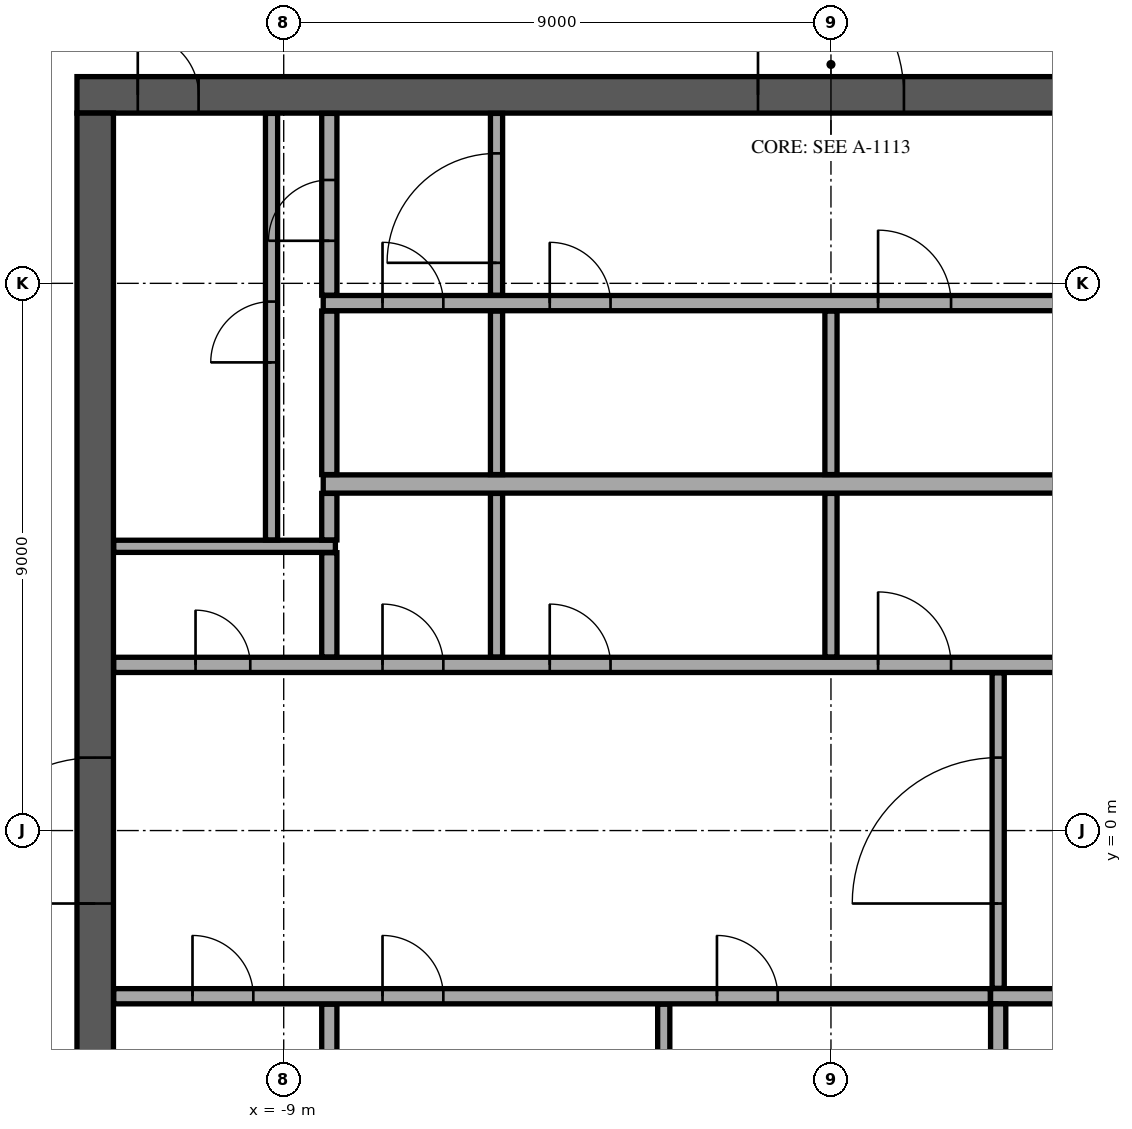
"""IFC4 building model, lengths in metres.
Left out: names, types, materials, properties, quantities, classifications, styles, units other than length and angle.
Written with IfcOpenShell. Run it as: python <this file> out.ifc"""

import sys

from ifc_helpers import new_model, si_unit, direction, frame, frame_2d, origin, place, context, subcontext, project, spatial, rectangle, extrude, element, fill, save


model = new_model("IFC4")
c1 = context("Model", 3, precision=1e-05, world=origin(), true_north=direction((0.0, 1.0)))
c2 = subcontext(c1, "Body", "Model", "MODEL_VIEW")
j1 = project(units=[si_unit("LENGTHUNIT", "METRE"), si_unit("PLANEANGLEUNIT", "RADIAN")], contexts=[c1])
p1 = place(None, origin())
s1 = spatial("IfcSite", under=j1, at=p1, CompositionType="ELEMENT")
p2 = place(p1, origin())
s2 = spatial("IfcBuilding", under=s1, at=p2, CompositionType="ELEMENT")
p3 = place(p2, frame((0.0, 0.0, 373.1)))
s3 = spatial("IfcBuildingStorey", under=s2, at=p3, CompositionType="ELEMENT", Elevation=373.1)
p4 = place(p3, frame((-12.4, 12.1, 0.0), z_axis=(0.0, 0.0, 1.0), x_axis=(1.0, 0.0, 0.0)))
e1 = element("IfcWall", 1, at=p4, inside=s3, PredefinedType="SHEAR", context=c2, shape_type="SweptSolid", body=[
    extrude(rectangle(XDim=24.8, YDim=0.6, at=frame_2d((12.4, 0.0))), origin(), (0.0, 0.0, 1.0), 3.2),
])
p5 = place(p4, frame((11.2, 0.0, 0.0)))
e2 = element("IfcOpeningElement", 2, at=p5, cuts=e1, PredefinedType="OPENING", context=c2, shape_type="SweptSolid", body=[
    extrude(rectangle(XDim=2.4, YDim=2.4, at=frame_2d((1.2, 1.2))), frame((0.0, 0.31, 0.0), z_axis=(0.0, -1.0, 0.0), x_axis=(1.0, 0.0, 0.0)), (0.0, 0.0, 1.0), 0.62),
])
p6 = place(p4, frame((22.025, 0.0, 0.0)))
e3 = element("IfcOpeningElement", 3, at=p6, cuts=e1, PredefinedType="OPENING", context=c2, shape_type="SweptSolid", body=[
    extrude(rectangle(XDim=1.2, YDim=2.1, at=frame_2d((0.6, 1.05))), frame((0.0, 0.31, 0.0), z_axis=(0.0, -1.0, 0.0), x_axis=(1.0, 0.0, 0.0)), (0.0, 0.0, 1.0), 0.62),
])
p7 = place(p4, frame((1.0, 0.0, 0.0)))
e4 = element("IfcOpeningElement", 4, at=p7, cuts=e1, PredefinedType="OPENING", context=c2, shape_type="SweptSolid", body=[
    extrude(rectangle(XDim=1.0, YDim=2.1, at=frame_2d((0.5, 1.05))), frame((0.0, 0.31, 0.0), z_axis=(0.0, -1.0, 0.0), x_axis=(1.0, 0.0, 0.0)), (0.0, 0.0, 1.0), 0.62),
])
p8 = place(p3, frame((-12.1, -11.8, 0.0), z_axis=(0.0, 0.0, 1.0), x_axis=(0.0, 1.0, 0.0)))
e5 = element("IfcWall", 5, at=p8, inside=s3, PredefinedType="SHEAR", context=c2, shape_type="SweptSolid", body=[
    extrude(rectangle(XDim=23.6, YDim=0.6, at=frame_2d((11.8, 0.0))), origin(), (0.0, 0.0, 1.0), 3.2),
])
p9 = place(p8, frame((10.6, 0.0, 0.0)))
e6 = element("IfcOpeningElement", 6, at=p9, cuts=e5, PredefinedType="OPENING", context=c2, shape_type="SweptSolid", body=[
    extrude(rectangle(XDim=2.4, YDim=2.4, at=frame_2d((1.2, 1.2))), frame((0.0, 0.31, 0.0), z_axis=(0.0, -1.0, 0.0), x_axis=(1.0, 0.0, 0.0)), (0.0, 0.0, 1.0), 0.62),
])
p10 = place(p3, frame((2.625, -2.725, 0.0), z_axis=(0.0, 0.0, 1.0), x_axis=(1.0, 0.0, 0.0)))
e7 = element("IfcWall", 7, at=p10, inside=s3, PredefinedType="SOLIDWALL", context=c2, shape_type="SweptSolid", body=[
    extrude(rectangle(XDim=3.0, YDim=0.25, at=frame_2d((1.5, 0.0))), origin(), (0.0, 0.0, 1.0), 3.2),
])
p11 = place(p3, frame((2.75, -5.55, 0.0), z_axis=(0.0, 0.0, 1.0), x_axis=(0.0, 1.0, 0.0)))
e8 = element("IfcWall", 8, at=p11, inside=s3, PredefinedType="SOLIDWALL", context=c2, shape_type="SweptSolid", body=[
    extrude(rectangle(XDim=2.7, YDim=0.25, at=frame_2d((1.35, 0.0))), origin(), (0.0, 0.0, 1.0), 3.2),
])
p12 = place(p3, frame((-8.25, -5.545, 0.0), z_axis=(0.0, 0.0, 1.0), x_axis=(0.0, 1.0, 0.0)))
e9 = element("IfcWall", 9, at=p12, inside=s3, PredefinedType="PARTITIONING", context=c2, shape_type="SweptSolid", body=[
    extrude(rectangle(XDim=2.69, YDim=0.25, at=frame_2d((1.345, 0.0))), origin(), (0.0, 0.0, 1.0), 3.2),
])
p13 = place(p3, frame((-2.75, -5.545, 0.0), z_axis=(0.0, 0.0, 1.0), x_axis=(0.0, 1.0, 0.0)))
e10 = element("IfcWall", 10, at=p13, inside=s3, PredefinedType="PARTITIONING", context=c2, shape_type="SweptSolid", body=[
    extrude(rectangle(XDim=2.69, YDim=0.2, at=frame_2d((1.345, 0.0))), origin(), (0.0, 0.0, 1.0), 3.2),
])
p14 = place(p3, frame((-11.795, -2.725, 0.0), z_axis=(0.0, 0.0, 1.0), x_axis=(1.0, 0.0, 0.0)))
e11 = element("IfcWall", 11, at=p14, inside=s3, PredefinedType="PARTITIONING", context=c2, shape_type="SweptSolid", body=[
    extrude(rectangle(XDim=14.415, YDim=0.25, at=frame_2d((7.208, 0.0))), origin(), (0.0, 0.0, 1.0), 3.2),
])
p15 = place(p14, frame((1.295, 0.0, 0.0)))
e12 = element("IfcOpeningElement", 12, at=p15, cuts=e11, PredefinedType="OPENING", context=c2, shape_type="SweptSolid", body=[
    extrude(rectangle(XDim=1.0, YDim=2.1, at=frame_2d((0.5, 1.05))), frame((0.0, 0.135, 0.0), z_axis=(0.0, -1.0, 0.0), x_axis=(1.0, 0.0, 0.0)), (0.0, 0.0, 1.0), 0.27),
])
p16 = place(p14, frame((4.42, 0.0, 0.0)))
e13 = element("IfcOpeningElement", 13, at=p16, cuts=e11, PredefinedType="OPENING", context=c2, shape_type="SweptSolid", body=[
    extrude(rectangle(XDim=1.0, YDim=2.1, at=frame_2d((0.5, 1.05))), frame((0.0, 0.135, 0.0), z_axis=(0.0, -1.0, 0.0), x_axis=(1.0, 0.0, 0.0)), (0.0, 0.0, 1.0), 0.27),
])
p17 = place(p14, frame((9.92, 0.0, 0.0)))
e14 = element("IfcOpeningElement", 14, at=p17, cuts=e11, PredefinedType="OPENING", context=c2, shape_type="SweptSolid", body=[
    extrude(rectangle(XDim=1.0, YDim=2.1, at=frame_2d((0.5, 1.05))), frame((0.0, 0.135, 0.0), z_axis=(0.0, -1.0, 0.0), x_axis=(1.0, 0.0, 0.0)), (0.0, 0.0, 1.0), 0.27),
])
p18 = place(p3, frame((2.75, -2.595, 0.0), z_axis=(0.0, 0.0, 1.0), x_axis=(0.0, 1.0, 0.0)))
e15 = element("IfcWall", 15, at=p18, inside=s3, PredefinedType="PARTITIONING", context=c2, shape_type="SweptSolid", body=[
    extrude(rectangle(XDim=5.19, YDim=0.2, at=frame_2d((2.595, 0.0))), origin(), (0.0, 0.0, 1.0), 3.2),
])
p19 = place(p18, frame((1.395, 0.0, 0.0)))
e16 = element("IfcOpeningElement", 16, at=p19, cuts=e15, PredefinedType="OPENING", context=c2, shape_type="SweptSolid", body=[
    extrude(rectangle(XDim=2.4, YDim=2.4, at=frame_2d((1.2, 1.2))), frame((0.0, 0.11, 0.0), z_axis=(0.0, -1.0, 0.0), x_axis=(1.0, 0.0, 0.0)), (0.0, 0.0, 1.0), 0.22),
])
p20 = place(p3, frame((-11.795, 2.725, 0.0), z_axis=(0.0, 0.0, 1.0), x_axis=(1.0, 0.0, 0.0)))
e17 = element("IfcWall", 17, at=p20, inside=s3, PredefinedType="PARTITIONING", context=c2, shape_type="SweptSolid", body=[
    extrude(rectangle(XDim=23.59, YDim=0.25, at=frame_2d((11.795, 0.0))), origin(), (0.0, 0.0, 1.0), 3.2),
])
p21 = place(p20, frame((21.345, 0.0, 0.0)))
e18 = element("IfcOpeningElement", 18, at=p21, cuts=e17, PredefinedType="OPENING", context=c2, shape_type="SweptSolid", body=[
    extrude(rectangle(XDim=0.9, YDim=2.1, at=frame_2d((0.45, 1.05))), frame((0.0, 0.135, 0.0), z_axis=(0.0, -1.0, 0.0), x_axis=(1.0, 0.0, 0.0)), (0.0, 0.0, 1.0), 0.27),
])
p22 = place(p20, frame((1.345, 0.0, 0.0)))
e19 = element("IfcOpeningElement", 19, at=p22, cuts=e17, PredefinedType="OPENING", context=c2, shape_type="SweptSolid", body=[
    extrude(rectangle(XDim=0.9, YDim=2.1, at=frame_2d((0.45, 1.05))), frame((0.0, 0.135, 0.0), z_axis=(0.0, -1.0, 0.0), x_axis=(1.0, 0.0, 0.0)), (0.0, 0.0, 1.0), 0.27),
])
p23 = place(p20, frame((4.42, 0.0, 0.0)))
e20 = element("IfcOpeningElement", 20, at=p23, cuts=e17, PredefinedType="OPENING", context=c2, shape_type="SweptSolid", body=[
    extrude(rectangle(XDim=1.0, YDim=2.1, at=frame_2d((0.5, 1.05))), frame((0.0, 0.135, 0.0), z_axis=(0.0, -1.0, 0.0), x_axis=(1.0, 0.0, 0.0)), (0.0, 0.0, 1.0), 0.27),
])
p24 = place(p20, frame((7.17, 0.0, 0.0)))
e21 = element("IfcOpeningElement", 21, at=p24, cuts=e17, PredefinedType="OPENING", context=c2, shape_type="SweptSolid", body=[
    extrude(rectangle(XDim=1.0, YDim=2.1, at=frame_2d((0.5, 1.05))), frame((0.0, 0.135, 0.0), z_axis=(0.0, -1.0, 0.0), x_axis=(1.0, 0.0, 0.0)), (0.0, 0.0, 1.0), 0.27),
])
p25 = place(p20, frame((12.57, 0.0, 0.0)))
e22 = element("IfcOpeningElement", 22, at=p25, cuts=e17, PredefinedType="OPENING", context=c2, shape_type="SweptSolid", body=[
    extrude(rectangle(XDim=1.2, YDim=2.1, at=frame_2d((0.6, 1.05))), frame((0.0, 0.135, 0.0), z_axis=(0.0, -1.0, 0.0), x_axis=(1.0, 0.0, 0.0)), (0.0, 0.0, 1.0), 0.27),
])
p26 = place(p3, frame((-8.25, 2.855, 0.0), z_axis=(0.0, 0.0, 1.0), x_axis=(0.0, 1.0, 0.0)))
e23 = element("IfcWall", 23, at=p26, inside=s3, PredefinedType="PARTITIONING", context=c2, shape_type="SweptSolid", body=[
    extrude(rectangle(XDim=1.715, YDim=0.25, at=frame_2d((0.857, 0.0))), origin(), (0.0, 0.0, 1.0), 3.2),
])
for number, where, z_axis, x_axis in (
    (24, (-5.5, 2.855, 0.0), (0.0, 0.0, 1.0), (0.0, 1.0, 0.0)),
    (25, (0.0, 2.855, 0.0), (0.0, 0.0, 1.0), (0.0, 1.0, 0.0)),
):
    element("IfcWall", number, at=place(p3, frame(where, z_axis=z_axis, x_axis=x_axis)), inside=s3, PredefinedType="PARTITIONING", context=c2, shape_type="SweptSolid", body=[
        extrude(rectangle(XDim=2.69, YDim=0.2, at=frame_2d((1.345, 0.0))), origin(), (0.0, 0.0, 1.0), 3.2),
    ])
p27 = place(p3, frame((-11.795, 4.675, 0.0), z_axis=(0.0, 0.0, 1.0), x_axis=(1.0, 0.0, 0.0)))
e26 = element("IfcWall", 26, at=p27, inside=s3, PredefinedType="PARTITIONING", context=c2, shape_type="SweptSolid", body=[
    extrude(rectangle(XDim=3.645, YDim=0.2, at=frame_2d((1.823, 0.0))), origin(), (0.0, 0.0, 1.0), 3.2),
])
p28 = place(p3, frame((-9.2, 4.78, 0.0), z_axis=(0.0, 0.0, 1.0), x_axis=(0.0, 1.0, 0.0)))
e27 = element("IfcWall", 27, at=p28, inside=s3, PredefinedType="PARTITIONING", context=c2, shape_type="SweptSolid", body=[
    extrude(rectangle(XDim=7.015, YDim=0.2, at=frame_2d((3.507, 0.0))), origin(), (0.0, 0.0, 1.0), 3.2),
])
p29 = place(p28, frame((2.92, 0.0, 0.0)))
e28 = element("IfcOpeningElement", 28, at=p29, cuts=e27, PredefinedType="OPENING", context=c2, shape_type="SweptSolid", body=[
    extrude(rectangle(XDim=1.0, YDim=2.1, at=frame_2d((0.5, 1.05))), frame((0.0, 0.11, 0.0), z_axis=(0.0, -1.0, 0.0), x_axis=(1.0, 0.0, 0.0)), (0.0, 0.0, 1.0), 0.22),
])
p30 = place(p3, frame((-8.25, 4.78, 0.0), z_axis=(0.0, 0.0, 1.0), x_axis=(0.0, 1.0, 0.0)))
e29 = element("IfcWall", 29, at=p30, inside=s3, PredefinedType="PARTITIONING", context=c2, shape_type="SweptSolid", body=[
    extrude(rectangle(XDim=0.765, YDim=0.25, at=frame_2d((0.382, 0.0))), origin(), (0.0, 0.0, 1.0), 3.2),
])
p31 = place(p3, frame((-8.35, 5.7, 0.0), z_axis=(0.0, 0.0, 1.0), x_axis=(1.0, 0.0, 0.0)))
e30 = element("IfcWall", 30, at=p31, inside=s3, PredefinedType="PARTITIONING", context=c2, shape_type="SweptSolid", body=[
    extrude(rectangle(XDim=16.7, YDim=0.3, at=frame_2d((8.35, 0.0))), origin(), (0.0, 0.0, 1.0), 3.2),
])
p32 = place(p3, frame((-8.25, 5.855, 0.0), z_axis=(0.0, 0.0, 1.0), x_axis=(0.0, 1.0, 0.0)))
e31 = element("IfcWall", 31, at=p32, inside=s3, PredefinedType="PARTITIONING", context=c2, shape_type="SweptSolid", body=[
    extrude(rectangle(XDim=2.69, YDim=0.25, at=frame_2d((1.345, 0.0))), origin(), (0.0, 0.0, 1.0), 3.2),
])
for number, where, z_axis, x_axis in (
    (32, (-5.5, 5.855, 0.0), (0.0, 0.0, 1.0), (0.0, 1.0, 0.0)),
    (33, (0.0, 5.855, 0.0), (0.0, 0.0, 1.0), (0.0, 1.0, 0.0)),
):
    element("IfcWall", number, at=place(p3, frame(where, z_axis=z_axis, x_axis=x_axis)), inside=s3, PredefinedType="PARTITIONING", context=c2, shape_type="SweptSolid", body=[
        extrude(rectangle(XDim=2.69, YDim=0.2, at=frame_2d((1.345, 0.0))), origin(), (0.0, 0.0, 1.0), 3.2),
    ])
p33 = place(p3, frame((-8.35, 8.675, 0.0), z_axis=(0.0, 0.0, 1.0), x_axis=(1.0, 0.0, 0.0)))
e34 = element("IfcWall", 34, at=p33, inside=s3, PredefinedType="PARTITIONING", context=c2, shape_type="SweptSolid", body=[
    extrude(rectangle(XDim=16.72, YDim=0.25, at=frame_2d((8.36, 0.0))), origin(), (0.0, 0.0, 1.0), 3.2),
])
p34 = place(p33, frame((0.975, 0.0, 0.0)))
e35 = element("IfcOpeningElement", 35, at=p34, cuts=e34, PredefinedType="OPENING", context=c2, shape_type="SweptSolid", body=[
    extrude(rectangle(XDim=1.0, YDim=2.1, at=frame_2d((0.5, 1.05))), frame((0.0, 0.135, 0.0), z_axis=(0.0, -1.0, 0.0), x_axis=(1.0, 0.0, 0.0)), (0.0, 0.0, 1.0), 0.27),
])
p35 = place(p33, frame((3.725, 0.0, 0.0)))
e36 = element("IfcOpeningElement", 36, at=p35, cuts=e34, PredefinedType="OPENING", context=c2, shape_type="SweptSolid", body=[
    extrude(rectangle(XDim=1.0, YDim=2.1, at=frame_2d((0.5, 1.05))), frame((0.0, 0.135, 0.0), z_axis=(0.0, -1.0, 0.0), x_axis=(1.0, 0.0, 0.0)), (0.0, 0.0, 1.0), 0.27),
])
p36 = place(p33, frame((9.125, 0.0, 0.0)))
e37 = element("IfcOpeningElement", 37, at=p36, cuts=e34, PredefinedType="OPENING", context=c2, shape_type="SweptSolid", body=[
    extrude(rectangle(XDim=1.2, YDim=2.1, at=frame_2d((0.6, 1.05))), frame((0.0, 0.135, 0.0), z_axis=(0.0, -1.0, 0.0), x_axis=(1.0, 0.0, 0.0)), (0.0, 0.0, 1.0), 0.27),
])
p37 = place(p3, frame((-8.25, 8.805, 0.0), z_axis=(0.0, 0.0, 1.0), x_axis=(0.0, 1.0, 0.0)))
e38 = element("IfcWall", 38, at=p37, inside=s3, PredefinedType="PARTITIONING", context=c2, shape_type="SweptSolid", body=[
    extrude(rectangle(XDim=2.99, YDim=0.25, at=frame_2d((1.495, 0.0))), origin(), (0.0, 0.0, 1.0), 3.2),
])
p38 = place(p37, frame((0.895, 0.0, 0.0)))
e39 = element("IfcOpeningElement", 39, at=p38, cuts=e38, PredefinedType="OPENING", context=c2, shape_type="SweptSolid", body=[
    extrude(rectangle(XDim=1.0, YDim=2.1, at=frame_2d((0.5, 1.05))), frame((0.0, 0.135, 0.0), z_axis=(0.0, -1.0, 0.0), x_axis=(1.0, 0.0, 0.0)), (0.0, 0.0, 1.0), 0.27),
])
p39 = place(p3, frame((-5.5, 8.805, 0.0), z_axis=(0.0, 0.0, 1.0), x_axis=(0.0, 1.0, 0.0)))
e40 = element("IfcWall", 40, at=p39, inside=s3, PredefinedType="PARTITIONING", context=c2, shape_type="SweptSolid", body=[
    extrude(rectangle(XDim=2.99, YDim=0.2, at=frame_2d((1.495, 0.0))), origin(), (0.0, 0.0, 1.0), 3.2),
])
p40 = place(p39, frame((0.532, 0.0, 0.0)))
e41 = element("IfcOpeningElement", 41, at=p40, cuts=e40, PredefinedType="OPENING", context=c2, shape_type="SweptSolid", body=[
    extrude(rectangle(XDim=1.8, YDim=2.1, at=frame_2d((0.9, 1.05))), frame((0.0, 0.11, 0.0), z_axis=(0.0, -1.0, 0.0), x_axis=(1.0, 0.0, 0.0)), (0.0, 0.0, 1.0), 0.22),
])
p41 = place(p5, origin())
e42 = element("IfcDoor", 42, at=p41, inside=s3, OperationType="SINGLE_SWING_LEFT", PredefinedType="DOOR", context=c2, shape_type="SweptSolid", body=[
    extrude(rectangle(XDim=2.4, YDim=2.4, at=frame_2d((1.2, 1.2))), frame((0.0, 0.025, 0.0), z_axis=(0.0, -1.0, 0.0), x_axis=(1.0, 0.0, 0.0)), (0.0, 0.0, 1.0), 0.05),
])
fill(e2, e42)
p42 = place(p7, origin())
e43 = element("IfcDoor", 43, at=p42, inside=s3, OperationType="SINGLE_SWING_LEFT", PredefinedType="DOOR", context=c2, shape_type="SweptSolid", body=[
    extrude(rectangle(XDim=1.0, YDim=2.1, at=frame_2d((0.5, 1.05))), frame((0.0, 0.025, 0.0), z_axis=(0.0, -1.0, 0.0), x_axis=(1.0, 0.0, 0.0)), (0.0, 0.0, 1.0), 0.05),
])
fill(e4, e43)
p43 = place(p9, origin())
e44 = element("IfcDoor", 44, at=p43, inside=s3, OperationType="SINGLE_SWING_LEFT", PredefinedType="DOOR", context=c2, shape_type="SweptSolid", body=[
    extrude(rectangle(XDim=2.4, YDim=2.4, at=frame_2d((1.2, 1.2))), frame((0.0, 0.025, 0.0), z_axis=(0.0, -1.0, 0.0), x_axis=(1.0, 0.0, 0.0)), (0.0, 0.0, 1.0), 0.05),
])
fill(e6, e44)
p44 = place(p15, origin())
e45 = element("IfcDoor", 45, at=p44, inside=s3, OperationType="SINGLE_SWING_RIGHT", PredefinedType="DOOR", context=c2, shape_type="SweptSolid", body=[
    extrude(rectangle(XDim=1.0, YDim=2.1, at=frame_2d((0.5, 1.05))), frame((0.0, 0.025, 0.0), z_axis=(0.0, -1.0, 0.0), x_axis=(1.0, 0.0, 0.0)), (0.0, 0.0, 1.0), 0.05),
])
fill(e12, e45)
p45 = place(p22, origin())
e46 = element("IfcDoor", 46, at=p45, inside=s3, OperationType="SINGLE_SWING_RIGHT", PredefinedType="DOOR", context=c2, shape_type="SweptSolid", body=[
    extrude(rectangle(XDim=0.9, YDim=2.1, at=frame_2d((0.45, 1.05))), frame((0.0, 0.025, 0.0), z_axis=(0.0, -1.0, 0.0), x_axis=(1.0, 0.0, 0.0)), (0.0, 0.0, 1.0), 0.05),
])
fill(e19, e46)
p46 = place(p29, origin())
e47 = element("IfcDoor", 47, at=p46, inside=s3, OperationType="SINGLE_SWING_RIGHT", PredefinedType="DOOR", context=c2, shape_type="SweptSolid", body=[
    extrude(rectangle(XDim=1.0, YDim=2.1, at=frame_2d((0.5, 1.05))), frame((0.0, 0.025, 0.0), z_axis=(0.0, -1.0, 0.0), x_axis=(1.0, 0.0, 0.0)), (0.0, 0.0, 1.0), 0.05),
])
fill(e28, e47)
p47 = place(p38, origin())
e48 = element("IfcDoor", 48, at=p47, inside=s3, OperationType="SINGLE_SWING_RIGHT", PredefinedType="DOOR", context=c2, shape_type="SweptSolid", body=[
    extrude(rectangle(XDim=1.0, YDim=2.1, at=frame_2d((0.5, 1.05))), frame((0.0, 0.025, 0.0), z_axis=(0.0, -1.0, 0.0), x_axis=(1.0, 0.0, 0.0)), (0.0, 0.0, 1.0), 0.05),
])
fill(e39, e48)
p48 = place(p23, origin())
e49 = element("IfcDoor", 49, at=p48, inside=s3, OperationType="SINGLE_SWING_RIGHT", PredefinedType="DOOR", context=c2, shape_type="SweptSolid", body=[
    extrude(rectangle(XDim=1.0, YDim=2.1, at=frame_2d((0.5, 1.05))), frame((0.0, 0.025, 0.0), z_axis=(0.0, -1.0, 0.0), x_axis=(1.0, 0.0, 0.0)), (0.0, 0.0, 1.0), 0.05),
])
fill(e20, e49)
p49 = place(p24, origin())
e50 = element("IfcDoor", 50, at=p49, inside=s3, OperationType="SINGLE_SWING_RIGHT", PredefinedType="DOOR", context=c2, shape_type="SweptSolid", body=[
    extrude(rectangle(XDim=1.0, YDim=2.1, at=frame_2d((0.5, 1.05))), frame((0.0, 0.025, 0.0), z_axis=(0.0, -1.0, 0.0), x_axis=(1.0, 0.0, 0.0)), (0.0, 0.0, 1.0), 0.05),
])
fill(e21, e50)
p50 = place(p25, origin())
e51 = element("IfcDoor", 51, at=p50, inside=s3, OperationType="SINGLE_SWING_LEFT", PredefinedType="DOOR", context=c2, shape_type="SweptSolid", body=[
    extrude(rectangle(XDim=1.2, YDim=2.1, at=frame_2d((0.6, 1.05))), frame((0.0, 0.025, 0.0), z_axis=(0.0, -1.0, 0.0), x_axis=(1.0, 0.0, 0.0)), (0.0, 0.0, 1.0), 0.05),
])
fill(e22, e51)
p51 = place(p34, origin())
e52 = element("IfcDoor", 52, at=p51, inside=s3, OperationType="SINGLE_SWING_RIGHT", PredefinedType="DOOR", context=c2, shape_type="SweptSolid", body=[
    extrude(rectangle(XDim=1.0, YDim=2.1, at=frame_2d((0.5, 1.05))), frame((0.0, 0.025, 0.0), z_axis=(0.0, -1.0, 0.0), x_axis=(1.0, 0.0, 0.0)), (0.0, 0.0, 1.0), 0.05),
])
fill(e35, e52)
p52 = place(p35, origin())
e53 = element("IfcDoor", 53, at=p52, inside=s3, OperationType="SINGLE_SWING_RIGHT", PredefinedType="DOOR", context=c2, shape_type="SweptSolid", body=[
    extrude(rectangle(XDim=1.0, YDim=2.1, at=frame_2d((0.5, 1.05))), frame((0.0, 0.025, 0.0), z_axis=(0.0, -1.0, 0.0), x_axis=(1.0, 0.0, 0.0)), (0.0, 0.0, 1.0), 0.05),
])
fill(e36, e53)
p53 = place(p36, origin())
e54 = element("IfcDoor", 54, at=p53, inside=s3, OperationType="SINGLE_SWING_LEFT", PredefinedType="DOOR", context=c2, shape_type="SweptSolid", body=[
    extrude(rectangle(XDim=1.2, YDim=2.1, at=frame_2d((0.6, 1.05))), frame((0.0, 0.025, 0.0), z_axis=(0.0, -1.0, 0.0), x_axis=(1.0, 0.0, 0.0)), (0.0, 0.0, 1.0), 0.05),
])
fill(e37, e54)
p54 = place(p16, origin())
e55 = element("IfcDoor", 55, at=p54, inside=s3, OperationType="SINGLE_SWING_RIGHT", PredefinedType="DOOR", context=c2, shape_type="SweptSolid", body=[
    extrude(rectangle(XDim=1.0, YDim=2.1, at=frame_2d((0.5, 1.05))), frame((0.0, 0.025, 0.0), z_axis=(0.0, -1.0, 0.0), x_axis=(1.0, 0.0, 0.0)), (0.0, 0.0, 1.0), 0.05),
])
fill(e13, e55)
p55 = place(p17, origin())
e56 = element("IfcDoor", 56, at=p55, inside=s3, OperationType="SINGLE_SWING_RIGHT", PredefinedType="DOOR", context=c2, shape_type="SweptSolid", body=[
    extrude(rectangle(XDim=1.0, YDim=2.1, at=frame_2d((0.5, 1.05))), frame((0.0, 0.025, 0.0), z_axis=(0.0, -1.0, 0.0), x_axis=(1.0, 0.0, 0.0)), (0.0, 0.0, 1.0), 0.05),
])
fill(e14, e56)
p56 = place(p19, origin())
e57 = element("IfcDoor", 57, at=p56, inside=s3, OperationType="DOUBLE_DOOR_DOUBLE_SWING", PredefinedType="DOOR", context=c2, shape_type="SweptSolid", body=[
    extrude(rectangle(XDim=2.4, YDim=2.4, at=frame_2d((1.2, 1.2))), frame((0.0, 0.025, 0.0), z_axis=(0.0, -1.0, 0.0), x_axis=(1.0, 0.0, 0.0)), (0.0, 0.0, 1.0), 0.05),
])
fill(e16, e57)
p57 = place(p40, origin())
e58 = element("IfcDoor", 58, at=p57, inside=s3, OperationType="SINGLE_SWING_LEFT", PredefinedType="DOOR", context=c2, shape_type="SweptSolid", body=[
    extrude(rectangle(XDim=1.8, YDim=2.1, at=frame_2d((0.9, 1.05))), frame((0.0, 0.025, 0.0), z_axis=(0.0, -1.0, 0.0), x_axis=(1.0, 0.0, 0.0)), (0.0, 0.0, 1.0), 0.05),
])
fill(e41, e58)
save(model, sys.argv[1])
